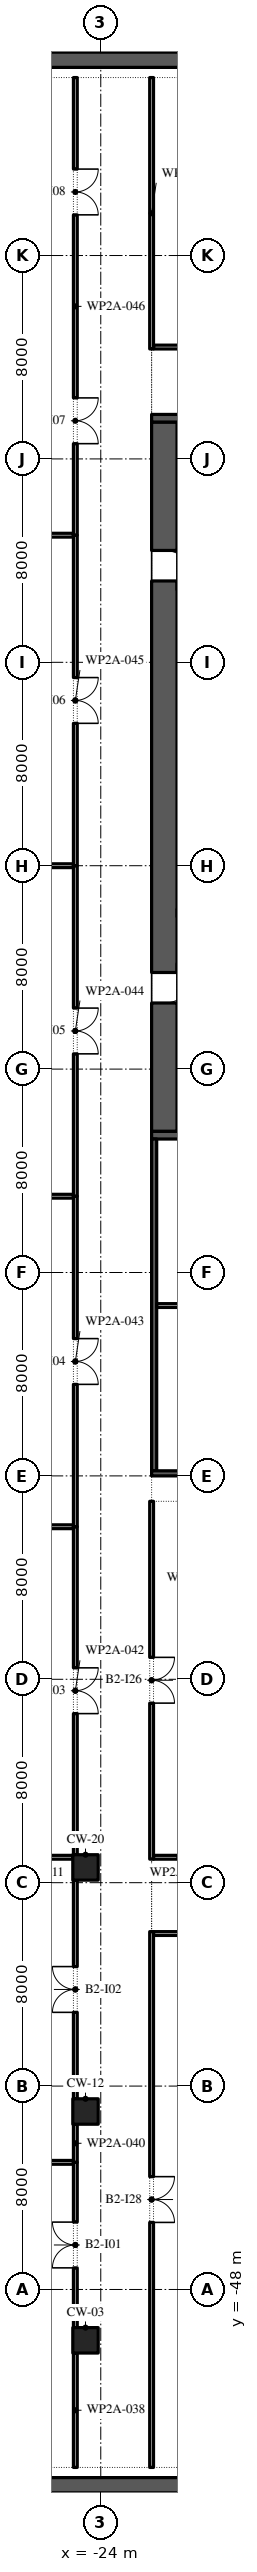
"""IFC4 building model, lengths in metres.
Left out: names, types, materials, properties, quantities, classifications, styles, units other than length and angle.
Written with IfcOpenShell. Run it as: python <this file> out.ifc"""

import sys

from ifc_helpers import new_model, si_unit, direction, frame, frame_2d, origin, origin_2d, place, context, subcontext, project, spatial, rectangle, extrude, element, fill, save


model = new_model("IFC4")
c1 = context("Model", 3, precision=1e-05, world=origin(), true_north=direction((0.0, 1.0)))
c2 = subcontext(c1, "Body", "Model", "MODEL_VIEW")
j1 = project(units=[si_unit("LENGTHUNIT", "METRE"), si_unit("PLANEANGLEUNIT", "RADIAN")], contexts=[c1])
p1 = place(None, origin())
s1 = spatial("IfcSite", under=j1, at=p1, CompositionType="ELEMENT")
p2 = place(p1, origin())
s2 = spatial("IfcBuilding", under=s1, at=p2, CompositionType="ELEMENT")
p3 = place(p2, frame((0.0, 0.0, -10.4)))
s3 = spatial("IfcBuildingStorey", under=s2, at=p3, CompositionType="ELEMENT", Elevation=-10.4)
for number, where, z_axis, x_axis in (
    (1, (-48.0, -55.7, -0.3), (0.0, 0.0, 1.0), (1.0, 0.0, 0.0)),
    (2, (-48.0, 39.7, -0.3), (0.0, 0.0, 1.0), (1.0, 0.0, 0.0)),
):
    element("IfcWall", number, at=place(p3, frame(where, z_axis=z_axis, x_axis=x_axis)), inside=s3, PredefinedType="SOLIDWALL", context=c2, shape_type="SweptSolid", body=[
        extrude(rectangle(XDim=96.0, YDim=0.6, at=frame_2d((48.0, 0.0))), origin(), (0.0, 0.0, 1.0), 5.5),
    ])
for number, where, z_axis, x_axis in (
    (3, (-24.6, -50.0, -0.3), (0.0, 0.0, 1.0), (1.0, 0.0, 0.0)),
    (4, (-24.6, -41.0, -0.3), (0.0, 0.0, 1.0), (1.0, 0.0, 0.0)),
    (5, (-24.6, -31.4, -0.3), (0.0, 0.0, 1.0), (1.0, 0.0, 0.0)),
):
    element("IfcColumn", number, at=place(p3, frame(where, z_axis=z_axis, x_axis=x_axis)), inside=s3, PredefinedType="COLUMN", context=c2, shape_type="SweptSolid", body=[
        extrude(rectangle(XDim=1.0, YDim=1.0, at=origin_2d()), origin(), (0.0, 0.0, 1.0), 5.5),
    ])
p4 = place(p3, frame((-21.5, -2.45, 0.0), z_axis=(0.0, 0.0, 1.0), x_axis=(0.0, 1.0, 0.0)))
e6 = element("IfcWall", 6, at=p4, inside=s3, PredefinedType="SHEAR", context=c2, shape_type="SweptSolid", body=[
    extrude(rectangle(XDim=27.9, YDim=1.0, at=frame_2d((13.95, 0.0))), origin(), (0.0, 0.0, 1.0), 4.9),
])
p5 = place(p4, frame((5.05, 0.0, 0.0)))
e7 = element("IfcOpeningElement", 7, at=p5, cuts=e6, PredefinedType="OPENING", context=c2, shape_type="SweptSolid", body=[
    extrude(rectangle(XDim=1.2, YDim=2.1, at=frame_2d((0.6, 1.05))), frame((0.0, 0.51, 0.0), z_axis=(0.0, -1.0, 0.0), x_axis=(1.0, 0.0, 0.0)), (0.0, 0.0, 1.0), 1.02),
])
p6 = place(p4, frame((21.65, 0.0, 0.0)))
e8 = element("IfcOpeningElement", 8, at=p6, cuts=e6, PredefinedType="OPENING", context=c2, shape_type="SweptSolid", body=[
    extrude(rectangle(XDim=1.2, YDim=2.1, at=frame_2d((0.6, 1.05))), frame((0.0, 0.51, 0.0), z_axis=(0.0, -1.0, 0.0), x_axis=(1.0, 0.0, 0.0)), (0.0, 0.0, 1.0), 1.02),
])
for number, where, z_axis, x_axis in (
    (9, (-22.0, -2.6, 0.0), (0.0, 0.0, 1.0), (1.0, 0.0, 0.0)),
    (10, (-22.0, 25.6, 0.0), (0.0, 0.0, 1.0), (1.0, 0.0, 0.0)),
):
    element("IfcWall", number, at=place(p3, frame(where, z_axis=z_axis, x_axis=x_axis)), inside=s3, PredefinedType="SHEAR", context=c2, shape_type="SweptSolid", body=[
        extrude(rectangle(XDim=12.0, YDim=0.3, at=frame_2d((6.0, 0.0))), origin(), (0.0, 0.0, 1.0), 4.9),
    ])
p7 = place(p3, frame((-21.9, -15.8, 0.0), z_axis=(0.0, 0.0, 1.0), x_axis=(0.0, 1.0, 0.0)))
e11 = element("IfcWall", 11, at=p7, inside=s3, PredefinedType="SHEAR", context=c2, shape_type="SweptSolid", body=[
    extrude(rectangle(XDim=13.05, YDim=0.2, at=frame_2d((6.525, 0.0))), origin(), (0.0, 0.0, 1.0), 4.9),
])
p8 = place(p3, frame((-22.0, -15.9, 0.0), z_axis=(0.0, 0.0, 1.0), x_axis=(1.0, 0.0, 0.0)))
e12 = element("IfcWall", 12, at=p8, inside=s3, PredefinedType="SHEAR", context=c2, shape_type="SweptSolid", body=[
    extrude(rectangle(XDim=12.0, YDim=0.2, at=frame_2d((6.0, 0.0))), origin(), (0.0, 0.0, 1.0), 4.9),
])
p9 = place(p3, frame((-21.8, -9.3, 0.0), z_axis=(0.0, 0.0, 1.0), x_axis=(1.0, 0.0, 0.0)))
e13 = element("IfcWall", 13, at=p9, inside=s3, PredefinedType="PARTITIONING", context=c2, shape_type="SweptSolid", body=[
    extrude(rectangle(XDim=11.6, YDim=0.15, at=frame_2d((5.8, 0.0))), origin(), (0.0, 0.0, 1.0), 4.9),
])
p10 = place(p3, frame((-35.0, -43.0, 0.0), z_axis=(0.0, 0.0, 1.0), x_axis=(1.0, 0.0, 0.0)))
e14 = element("IfcWall", 14, at=p10, inside=s3, PredefinedType="PARTITIONING", context=c2, shape_type="SweptSolid", body=[
    extrude(rectangle(XDim=9.925, YDim=0.15, at=frame_2d((4.962, 0.0))), origin(), (0.0, 0.0, 1.0), 4.9),
])
p11 = place(p3, frame((-21.925, -34.0, 0.0), z_axis=(0.0, 0.0, 1.0), x_axis=(1.0, 0.0, 0.0)))
e15 = element("IfcWall", 15, at=p11, inside=s3, PredefinedType="PARTITIONING", context=c2, shape_type="SweptSolid", body=[
    extrude(rectangle(XDim=10.925, YDim=0.15, at=frame_2d((5.462, 0.0))), origin(), (0.0, 0.0, 1.0), 4.9),
])
p12 = place(p3, frame((-28.1, -31.0, 0.0), z_axis=(0.0, 0.0, 1.0), x_axis=(1.0, 0.0, 0.0)))
e16 = element("IfcWall", 16, at=p12, inside=s3, PredefinedType="PARTITIONING", context=c2, shape_type="SweptSolid", body=[
    extrude(rectangle(XDim=3.0, YDim=0.15, at=frame_2d((1.5, 0.0))), origin(), (0.0, 0.0, 1.0), 4.9),
])
p13 = place(p3, frame((-21.925, -31.0, 0.0), z_axis=(0.0, 0.0, 1.0), x_axis=(1.0, 0.0, 0.0)))
e17 = element("IfcWall", 17, at=p13, inside=s3, PredefinedType="PARTITIONING", context=c2, shape_type="SweptSolid", body=[
    extrude(rectangle(XDim=2.025, YDim=0.15, at=frame_2d((1.013, 0.0))), origin(), (0.0, 0.0, 1.0), 4.9),
])
for number, where, z_axis, x_axis in (
    (18, (-47.0, -18.0, 0.0), (0.0, 0.0, 1.0), (1.0, 0.0, 0.0)),
    (19, (-47.0, -5.0, 0.0), (0.0, 0.0, 1.0), (1.0, 0.0, 0.0)),
    (20, (-47.0, 8.0, 0.0), (0.0, 0.0, 1.0), (1.0, 0.0, 0.0)),
    (21, (-47.0, 21.0, 0.0), (0.0, 0.0, 1.0), (1.0, 0.0, 0.0)),
):
    element("IfcWall", number, at=place(p3, frame(where, z_axis=z_axis, x_axis=x_axis)), inside=s3, PredefinedType="PARTITIONING", context=c2, shape_type="SweptSolid", body=[
        extrude(rectangle(XDim=21.925, YDim=0.15, at=frame_2d((10.962, 0.0))), origin(), (0.0, 0.0, 1.0), 4.9),
    ])
p14 = place(p3, frame((-21.925, 28.4, 0.0), z_axis=(0.0, 0.0, 1.0), x_axis=(1.0, 0.0, 0.0)))
e22 = element("IfcWall", 22, at=p14, inside=s3, PredefinedType="PARTITIONING", context=c2, shape_type="SweptSolid", body=[
    extrude(rectangle(XDim=21.925, YDim=0.15, at=frame_2d((10.962, 0.0))), origin(), (0.0, 0.0, 1.0), 4.9),
])
p15 = place(p14, frame((10.062, 0.0, 0.0)))
e23 = element("IfcOpeningElement", 23, at=p15, cuts=e22, PredefinedType="OPENING", context=c2, shape_type="SweptSolid", body=[
    extrude(rectangle(XDim=1.8, YDim=2.1, at=frame_2d((0.9, 1.05))), frame((0.0, 0.085, 0.0), z_axis=(0.0, -1.0, 0.0), x_axis=(1.0, 0.0, 0.0)), (0.0, 0.0, 1.0), 0.17),
])
p16 = place(p3, frame((-25.0, -55.0, 0.0), z_axis=(0.0, 0.0, 1.0), x_axis=(0.0, 1.0, 0.0)))
e24 = element("IfcWall", 24, at=p16, inside=s3, PredefinedType="PARTITIONING", context=c2, shape_type="SweptSolid", body=[
    extrude(rectangle(XDim=4.5, YDim=0.15, at=frame_2d((2.25, 0.0))), origin(), (0.0, 0.0, 1.0), 4.9),
])
p17 = place(p3, frame((-25.0, -49.5, 0.0), z_axis=(0.0, 0.0, 1.0), x_axis=(0.0, 1.0, 0.0)))
e25 = element("IfcWall", 25, at=p17, inside=s3, PredefinedType="PARTITIONING", context=c2, shape_type="SweptSolid", body=[
    extrude(rectangle(XDim=6.5, YDim=0.15, at=frame_2d((3.25, 0.0))), origin(), (0.0, 0.0, 1.0), 4.9),
])
p18 = place(p17, frame((2.35, 0.0, 0.0)))
e26 = element("IfcOpeningElement", 26, at=p18, cuts=e25, PredefinedType="OPENING", context=c2, shape_type="SweptSolid", body=[
    extrude(rectangle(XDim=1.8, YDim=2.1, at=frame_2d((0.9, 1.05))), frame((0.0, 0.085, 0.0), z_axis=(0.0, -1.0, 0.0), x_axis=(1.0, 0.0, 0.0)), (0.0, 0.0, 1.0), 0.17),
])
p19 = place(p3, frame((-25.0, -43.0, 0.0), z_axis=(0.0, 0.0, 1.0), x_axis=(0.0, 1.0, 0.0)))
e27 = element("IfcWall", 27, at=p19, inside=s3, PredefinedType="PARTITIONING", context=c2, shape_type="SweptSolid", body=[
    extrude(rectangle(XDim=1.5, YDim=0.15, at=frame_2d((0.75, 0.0))), origin(), (0.0, 0.0, 1.0), 4.9),
])
p20 = place(p3, frame((-25.0, -40.5, 0.0), z_axis=(0.0, 0.0, 1.0), x_axis=(0.0, 1.0, 0.0)))
e28 = element("IfcWall", 28, at=p20, inside=s3, PredefinedType="PARTITIONING", context=c2, shape_type="SweptSolid", body=[
    extrude(rectangle(XDim=8.6, YDim=0.15, at=frame_2d((4.3, 0.0))), origin(), (0.0, 0.0, 1.0), 4.9),
])
p21 = place(p20, frame((3.4, 0.0, 0.0)))
e29 = element("IfcOpeningElement", 29, at=p21, cuts=e28, PredefinedType="OPENING", context=c2, shape_type="SweptSolid", body=[
    extrude(rectangle(XDim=1.8, YDim=2.1, at=frame_2d((0.9, 1.05))), frame((0.0, 0.085, 0.0), z_axis=(0.0, -1.0, 0.0), x_axis=(1.0, 0.0, 0.0)), (0.0, 0.0, 1.0), 0.17),
])
p22 = place(p3, frame((-25.0, -30.9, 0.0), z_axis=(0.0, 0.0, 1.0), x_axis=(0.0, 1.0, 0.0)))
e30 = element("IfcWall", 30, at=p22, inside=s3, PredefinedType="PARTITIONING", context=c2, shape_type="SweptSolid", body=[
    extrude(rectangle(XDim=12.9, YDim=0.15, at=frame_2d((6.45, 0.0))), origin(), (0.0, 0.0, 1.0), 4.9),
])
p23 = place(p22, frame((5.55, 0.0, 0.0)))
e31 = element("IfcOpeningElement", 31, at=p23, cuts=e30, PredefinedType="OPENING", context=c2, shape_type="SweptSolid", body=[
    extrude(rectangle(XDim=1.8, YDim=2.1, at=frame_2d((0.9, 1.05))), frame((0.0, 0.085, 0.0), z_axis=(0.0, -1.0, 0.0), x_axis=(1.0, 0.0, 0.0)), (0.0, 0.0, 1.0), 0.17),
])
p24 = place(p3, frame((-25.0, -18.0, 0.0), z_axis=(0.0, 0.0, 1.0), x_axis=(0.0, 1.0, 0.0)))
e32 = element("IfcWall", 32, at=p24, inside=s3, PredefinedType="PARTITIONING", context=c2, shape_type="SweptSolid", body=[
    extrude(rectangle(XDim=13.0, YDim=0.15, at=frame_2d((6.5, 0.0))), origin(), (0.0, 0.0, 1.0), 4.9),
])
p25 = place(p24, frame((5.6, 0.0, 0.0)))
e33 = element("IfcOpeningElement", 33, at=p25, cuts=e32, PredefinedType="OPENING", context=c2, shape_type="SweptSolid", body=[
    extrude(rectangle(XDim=1.8, YDim=2.1, at=frame_2d((0.9, 1.05))), frame((0.0, 0.085, 0.0), z_axis=(0.0, -1.0, 0.0), x_axis=(1.0, 0.0, 0.0)), (0.0, 0.0, 1.0), 0.17),
])
p26 = place(p3, frame((-25.0, -5.0, 0.0), z_axis=(0.0, 0.0, 1.0), x_axis=(0.0, 1.0, 0.0)))
e34 = element("IfcWall", 34, at=p26, inside=s3, PredefinedType="PARTITIONING", context=c2, shape_type="SweptSolid", body=[
    extrude(rectangle(XDim=13.0, YDim=0.15, at=frame_2d((6.5, 0.0))), origin(), (0.0, 0.0, 1.0), 4.9),
])
p27 = place(p26, frame((5.6, 0.0, 0.0)))
e35 = element("IfcOpeningElement", 35, at=p27, cuts=e34, PredefinedType="OPENING", context=c2, shape_type="SweptSolid", body=[
    extrude(rectangle(XDim=1.8, YDim=2.1, at=frame_2d((0.9, 1.05))), frame((0.0, 0.085, 0.0), z_axis=(0.0, -1.0, 0.0), x_axis=(1.0, 0.0, 0.0)), (0.0, 0.0, 1.0), 0.17),
])
p28 = place(p3, frame((-25.0, 8.0, 0.0), z_axis=(0.0, 0.0, 1.0), x_axis=(0.0, 1.0, 0.0)))
e36 = element("IfcWall", 36, at=p28, inside=s3, PredefinedType="PARTITIONING", context=c2, shape_type="SweptSolid", body=[
    extrude(rectangle(XDim=13.0, YDim=0.15, at=frame_2d((6.5, 0.0))), origin(), (0.0, 0.0, 1.0), 4.9),
])
p29 = place(p28, frame((5.6, 0.0, 0.0)))
e37 = element("IfcOpeningElement", 37, at=p29, cuts=e36, PredefinedType="OPENING", context=c2, shape_type="SweptSolid", body=[
    extrude(rectangle(XDim=1.8, YDim=2.1, at=frame_2d((0.9, 1.05))), frame((0.0, 0.085, 0.0), z_axis=(0.0, -1.0, 0.0), x_axis=(1.0, 0.0, 0.0)), (0.0, 0.0, 1.0), 0.17),
])
p30 = place(p3, frame((-25.0, 21.0, 0.0), z_axis=(0.0, 0.0, 1.0), x_axis=(0.0, 1.0, 0.0)))
e38 = element("IfcWall", 38, at=p30, inside=s3, PredefinedType="PARTITIONING", context=c2, shape_type="SweptSolid", body=[
    extrude(rectangle(XDim=18.0, YDim=0.15, at=frame_2d((9.0, 0.0))), origin(), (0.0, 0.0, 1.0), 4.9),
])
p31 = place(p30, frame((3.6, 0.0, 0.0)))
e39 = element("IfcOpeningElement", 39, at=p31, cuts=e38, PredefinedType="OPENING", context=c2, shape_type="SweptSolid", body=[
    extrude(rectangle(XDim=1.8, YDim=2.1, at=frame_2d((0.9, 1.05))), frame((0.0, 0.085, 0.0), z_axis=(0.0, -1.0, 0.0), x_axis=(1.0, 0.0, 0.0)), (0.0, 0.0, 1.0), 0.17),
])
p32 = place(p30, frame((12.6, 0.0, 0.0)))
e40 = element("IfcOpeningElement", 40, at=p32, cuts=e38, PredefinedType="OPENING", context=c2, shape_type="SweptSolid", body=[
    extrude(rectangle(XDim=1.8, YDim=2.1, at=frame_2d((0.9, 1.05))), frame((0.0, 0.085, 0.0), z_axis=(0.0, -1.0, 0.0), x_axis=(1.0, 0.0, 0.0)), (0.0, 0.0, 1.0), 0.17),
])
p33 = place(p3, frame((-22.0, -55.0, 0.0), z_axis=(0.0, 0.0, 1.0), x_axis=(0.0, 1.0, 0.0)))
e41 = element("IfcWall", 41, at=p33, inside=s3, PredefinedType="PARTITIONING", context=c2, shape_type="SweptSolid", body=[
    extrude(rectangle(XDim=21.075, YDim=0.15, at=frame_2d((10.538, 0.0))), origin(), (0.0, 0.0, 1.0), 4.9),
])
p34 = place(p33, frame((9.637, 0.0, 0.0)))
e42 = element("IfcOpeningElement", 42, at=p34, cuts=e41, PredefinedType="OPENING", context=c2, shape_type="SweptSolid", body=[
    extrude(rectangle(XDim=1.8, YDim=2.1, at=frame_2d((0.9, 1.05))), frame((0.0, 0.085, 0.0), z_axis=(0.0, -1.0, 0.0), x_axis=(1.0, 0.0, 0.0)), (0.0, 0.0, 1.0), 0.17),
])
p35 = place(p3, frame((-22.0, -31.075, 0.0), z_axis=(0.0, 0.0, 1.0), x_axis=(0.0, 1.0, 0.0)))
e43 = element("IfcWall", 43, at=p35, inside=s3, PredefinedType="PARTITIONING", context=c2, shape_type="SweptSolid", body=[
    extrude(rectangle(XDim=14.075, YDim=0.15, at=frame_2d((7.038, 0.0))), origin(), (0.0, 0.0, 1.0), 4.9),
])
p36 = place(p35, frame((6.137, 0.0, 0.0)))
e44 = element("IfcOpeningElement", 44, at=p36, cuts=e43, PredefinedType="OPENING", context=c2, shape_type="SweptSolid", body=[
    extrude(rectangle(XDim=1.8, YDim=2.1, at=frame_2d((0.9, 1.05))), frame((0.0, 0.085, 0.0), z_axis=(0.0, -1.0, 0.0), x_axis=(1.0, 0.0, 0.0)), (0.0, 0.0, 1.0), 0.17),
])
p37 = place(p3, frame((-22.0, 28.325, 0.0), z_axis=(0.0, 0.0, 1.0), x_axis=(0.0, 1.0, 0.0)))
e45 = element("IfcWall", 45, at=p37, inside=s3, PredefinedType="PARTITIONING", context=c2, shape_type="SweptSolid", body=[
    extrude(rectangle(XDim=10.675, YDim=0.15, at=frame_2d((5.337, 0.0))), origin(), (0.0, 0.0, 1.0), 4.9),
])
p38 = place(p5, frame((1.2, 0.0, 0.0), z_axis=(0.0, 0.0, 1.0), x_axis=(-1.0, 0.0, 0.0)))
e46 = element("IfcDoor", 46, at=p38, inside=s3, OperationType="SINGLE_SWING_RIGHT", PredefinedType="DOOR", context=c2, shape_type="SweptSolid", body=[
    extrude(rectangle(XDim=1.2, YDim=2.1, at=frame_2d((0.6, 1.05))), frame((0.0, 0.025, 0.0), z_axis=(0.0, -1.0, 0.0), x_axis=(1.0, 0.0, 0.0)), (0.0, 0.0, 1.0), 0.05),
])
fill(e7, e46)
p39 = place(p6, frame((1.2, 0.0, 0.0), z_axis=(0.0, 0.0, 1.0), x_axis=(-1.0, 0.0, 0.0)))
e47 = element("IfcDoor", 47, at=p39, inside=s3, OperationType="SINGLE_SWING_LEFT", PredefinedType="DOOR", context=c2, shape_type="SweptSolid", body=[
    extrude(rectangle(XDim=1.2, YDim=2.1, at=frame_2d((0.6, 1.05))), frame((0.0, 0.025, 0.0), z_axis=(0.0, -1.0, 0.0), x_axis=(1.0, 0.0, 0.0)), (0.0, 0.0, 1.0), 0.05),
])
fill(e8, e47)
p40 = place(p18, origin())
e48 = element("IfcDoor", 48, at=p40, inside=s3, OperationType="SINGLE_SWING_LEFT", PredefinedType="DOOR", context=c2, shape_type="SweptSolid", body=[
    extrude(rectangle(XDim=1.8, YDim=2.1, at=frame_2d((0.9, 1.05))), frame((0.0, 0.025, 0.0), z_axis=(0.0, -1.0, 0.0), x_axis=(1.0, 0.0, 0.0)), (0.0, 0.0, 1.0), 0.05),
])
fill(e26, e48)
p41 = place(p21, origin())
e49 = element("IfcDoor", 49, at=p41, inside=s3, OperationType="SINGLE_SWING_LEFT", PredefinedType="DOOR", context=c2, shape_type="SweptSolid", body=[
    extrude(rectangle(XDim=1.8, YDim=2.1, at=frame_2d((0.9, 1.05))), frame((0.0, 0.025, 0.0), z_axis=(0.0, -1.0, 0.0), x_axis=(1.0, 0.0, 0.0)), (0.0, 0.0, 1.0), 0.05),
])
fill(e29, e49)
p42 = place(p23, frame((1.8, 0.0, 0.0), z_axis=(0.0, 0.0, 1.0), x_axis=(-1.0, 0.0, 0.0)))
e50 = element("IfcDoor", 50, at=p42, inside=s3, OperationType="SINGLE_SWING_RIGHT", PredefinedType="DOOR", context=c2, shape_type="SweptSolid", body=[
    extrude(rectangle(XDim=1.8, YDim=2.1, at=frame_2d((0.9, 1.05))), frame((0.0, 0.025, 0.0), z_axis=(0.0, -1.0, 0.0), x_axis=(1.0, 0.0, 0.0)), (0.0, 0.0, 1.0), 0.05),
])
fill(e31, e50)
p43 = place(p25, frame((1.8, 0.0, 0.0), z_axis=(0.0, 0.0, 1.0), x_axis=(-1.0, 0.0, 0.0)))
e51 = element("IfcDoor", 51, at=p43, inside=s3, OperationType="SINGLE_SWING_LEFT", PredefinedType="DOOR", context=c2, shape_type="SweptSolid", body=[
    extrude(rectangle(XDim=1.8, YDim=2.1, at=frame_2d((0.9, 1.05))), frame((0.0, 0.025, 0.0), z_axis=(0.0, -1.0, 0.0), x_axis=(1.0, 0.0, 0.0)), (0.0, 0.0, 1.0), 0.05),
])
fill(e33, e51)
p44 = place(p27, frame((1.8, 0.0, 0.0), z_axis=(0.0, 0.0, 1.0), x_axis=(-1.0, 0.0, 0.0)))
e52 = element("IfcDoor", 52, at=p44, inside=s3, OperationType="SINGLE_SWING_LEFT", PredefinedType="DOOR", context=c2, shape_type="SweptSolid", body=[
    extrude(rectangle(XDim=1.8, YDim=2.1, at=frame_2d((0.9, 1.05))), frame((0.0, 0.025, 0.0), z_axis=(0.0, -1.0, 0.0), x_axis=(1.0, 0.0, 0.0)), (0.0, 0.0, 1.0), 0.05),
])
fill(e35, e52)
p45 = place(p29, frame((1.8, 0.0, 0.0), z_axis=(0.0, 0.0, 1.0), x_axis=(-1.0, 0.0, 0.0)))
e53 = element("IfcDoor", 53, at=p45, inside=s3, OperationType="SINGLE_SWING_LEFT", PredefinedType="DOOR", context=c2, shape_type="SweptSolid", body=[
    extrude(rectangle(XDim=1.8, YDim=2.1, at=frame_2d((0.9, 1.05))), frame((0.0, 0.025, 0.0), z_axis=(0.0, -1.0, 0.0), x_axis=(1.0, 0.0, 0.0)), (0.0, 0.0, 1.0), 0.05),
])
fill(e37, e53)
p46 = place(p31, frame((1.8, 0.0, 0.0), z_axis=(0.0, 0.0, 1.0), x_axis=(-1.0, 0.0, 0.0)))
e54 = element("IfcDoor", 54, at=p46, inside=s3, OperationType="SINGLE_SWING_LEFT", PredefinedType="DOOR", context=c2, shape_type="SweptSolid", body=[
    extrude(rectangle(XDim=1.8, YDim=2.1, at=frame_2d((0.9, 1.05))), frame((0.0, 0.025, 0.0), z_axis=(0.0, -1.0, 0.0), x_axis=(1.0, 0.0, 0.0)), (0.0, 0.0, 1.0), 0.05),
])
fill(e39, e54)
p47 = place(p32, frame((1.8, 0.0, 0.0), z_axis=(0.0, 0.0, 1.0), x_axis=(-1.0, 0.0, 0.0)))
e55 = element("IfcDoor", 55, at=p47, inside=s3, OperationType="SINGLE_SWING_RIGHT", PredefinedType="DOOR", context=c2, shape_type="SweptSolid", body=[
    extrude(rectangle(XDim=1.8, YDim=2.1, at=frame_2d((0.9, 1.05))), frame((0.0, 0.025, 0.0), z_axis=(0.0, -1.0, 0.0), x_axis=(1.0, 0.0, 0.0)), (0.0, 0.0, 1.0), 0.05),
])
fill(e40, e55)
p48 = place(p36, frame((1.8, 0.0, 0.0), z_axis=(0.0, 0.0, 1.0), x_axis=(-1.0, 0.0, 0.0)))
e56 = element("IfcDoor", 56, at=p48, inside=s3, OperationType="SINGLE_SWING_LEFT", PredefinedType="DOOR", context=c2, shape_type="SweptSolid", body=[
    extrude(rectangle(XDim=1.8, YDim=2.1, at=frame_2d((0.9, 1.05))), frame((0.0, 0.025, 0.0), z_axis=(0.0, -1.0, 0.0), x_axis=(1.0, 0.0, 0.0)), (0.0, 0.0, 1.0), 0.05),
])
fill(e44, e56)
p49 = place(p34, frame((1.8, 0.0, 0.0), z_axis=(0.0, 0.0, 1.0), x_axis=(-1.0, 0.0, 0.0)))
e57 = element("IfcDoor", 57, at=p49, inside=s3, OperationType="SINGLE_SWING_RIGHT", PredefinedType="DOOR", context=c2, shape_type="SweptSolid", body=[
    extrude(rectangle(XDim=1.8, YDim=2.1, at=frame_2d((0.9, 1.05))), frame((0.0, 0.025, 0.0), z_axis=(0.0, -1.0, 0.0), x_axis=(1.0, 0.0, 0.0)), (0.0, 0.0, 1.0), 0.05),
])
fill(e42, e57)
save(model, sys.argv[1])
